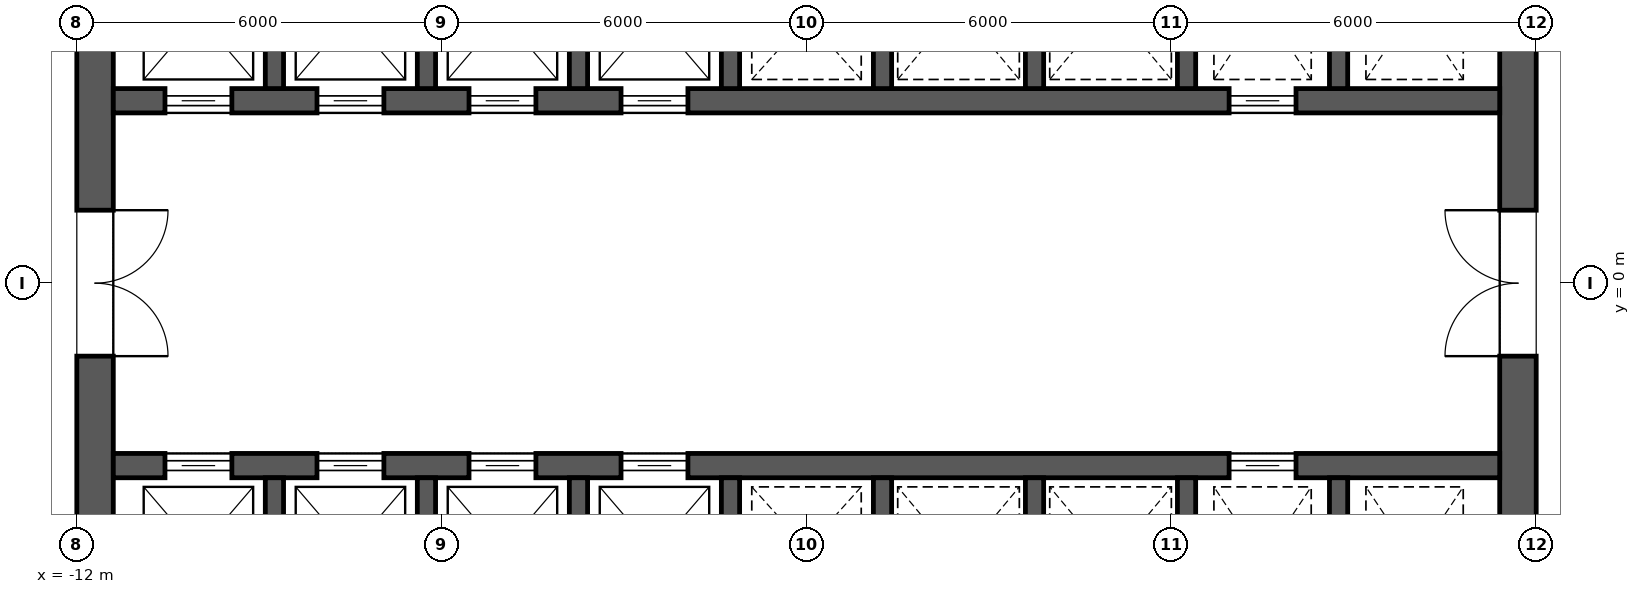
"""IFC4 building model, lengths in metres.
Left out: names, types, materials, properties, quantities, classifications, styles, units other than length and angle.
Written with IfcOpenShell. Run it as: python <this file> out.ifc"""

import sys

from ifc_helpers import new_model, si_unit, direction, frame, frame_2d, origin, place, context, subcontext, project, spatial, rectangle, extrude, element, fill, save


model = new_model("IFC4")
c1 = context("Model", 3, precision=1e-05, world=origin(), true_north=direction((0.0, 1.0)))
c2 = subcontext(c1, "Body", "Model", "MODEL_VIEW")
j1 = project(units=[si_unit("LENGTHUNIT", "METRE"), si_unit("PLANEANGLEUNIT", "RADIAN")], contexts=[c1])
p1 = place(None, origin())
s1 = spatial("IfcSite", under=j1, at=p1, CompositionType="ELEMENT")
p2 = place(p1, origin())
s2 = spatial("IfcBuilding", under=s1, at=p2, CompositionType="ELEMENT")
p3 = place(p2, frame((0.0, 0.0, 48.7)))
s3 = spatial("IfcBuildingStorey", under=s2, at=p3, CompositionType="ELEMENT", Elevation=48.7)
p4 = place(p3, frame((11.7, -11.4, 0.0), z_axis=(0.0, 0.0, 1.0), x_axis=(0.0, 1.0, 0.0)))
e1 = element("IfcWall", 1, at=p4, inside=s3, PredefinedType="SHEAR", context=c2, shape_type="SweptSolid", body=[
    extrude(rectangle(XDim=22.8, YDim=0.6, at=frame_2d((11.4, 0.0))), origin(), (0.0, 0.0, 1.0), 4.2),
])
p5 = place(p4, frame((10.2, 0.0, 0.0)))
e2 = element("IfcOpeningElement", 2, at=p5, cuts=e1, PredefinedType="OPENING", context=c2, shape_type="SweptSolid", body=[
    extrude(rectangle(XDim=2.4, YDim=2.1, at=frame_2d((1.2, 1.05))), frame((0.0, 0.312, 0.0), z_axis=(0.0, -1.0, 0.0), x_axis=(1.0, 0.0, 0.0)), (0.0, 0.0, 1.0), 0.624),
])
p6 = place(p4, frame((19.5, 0.0, 0.0)))
e3 = element("IfcOpeningElement", 3, at=p6, cuts=e1, PredefinedType="OPENING", context=c2, shape_type="SweptSolid", body=[
    extrude(rectangle(XDim=1.2, YDim=2.1, at=frame_2d((0.6, 1.05))), frame((0.0, 0.312, 0.0), z_axis=(0.0, -1.0, 0.0), x_axis=(1.0, 0.0, 0.0)), (0.0, 0.0, 1.0), 0.624),
])
p7 = place(p4, frame((2.1, 0.0, 0.0)))
e4 = element("IfcOpeningElement", 4, at=p7, cuts=e1, PredefinedType="OPENING", context=c2, shape_type="SweptSolid", body=[
    extrude(rectangle(XDim=1.2, YDim=2.1, at=frame_2d((0.6, 1.05))), frame((0.0, 0.312, 0.0), z_axis=(0.0, -1.0, 0.0), x_axis=(1.0, 0.0, 0.0)), (0.0, 0.0, 1.0), 0.624),
])
p8 = place(p3, frame((-11.7, -11.4, 0.0), z_axis=(0.0, 0.0, 1.0), x_axis=(0.0, 1.0, 0.0)))
e5 = element("IfcWall", 5, at=p8, inside=s3, PredefinedType="SHEAR", context=c2, shape_type="SweptSolid", body=[
    extrude(rectangle(XDim=22.8, YDim=0.6, at=frame_2d((11.4, 0.0))), origin(), (0.0, 0.0, 1.0), 4.2),
])
p9 = place(p8, frame((10.2, 0.0, 0.0)))
e6 = element("IfcOpeningElement", 6, at=p9, cuts=e5, PredefinedType="OPENING", context=c2, shape_type="SweptSolid", body=[
    extrude(rectangle(XDim=2.4, YDim=2.1, at=frame_2d((1.2, 1.05))), frame((0.0, 0.312, 0.0), z_axis=(0.0, -1.0, 0.0), x_axis=(1.0, 0.0, 0.0)), (0.0, 0.0, 1.0), 0.624),
])
p10 = place(p8, frame((18.925, 0.0, 0.0)))
e7 = element("IfcOpeningElement", 7, at=p10, cuts=e5, PredefinedType="OPENING", context=c2, shape_type="SweptSolid", body=[
    extrude(rectangle(XDim=1.2, YDim=2.1, at=frame_2d((0.6, 1.05))), frame((0.0, 0.312, 0.0), z_axis=(0.0, -1.0, 0.0), x_axis=(1.0, 0.0, 0.0)), (0.0, 0.0, 1.0), 0.624),
])
p11 = place(p8, frame((2.675, 0.0, 0.0)))
e8 = element("IfcOpeningElement", 8, at=p11, cuts=e5, PredefinedType="OPENING", context=c2, shape_type="SweptSolid", body=[
    extrude(rectangle(XDim=1.2, YDim=2.1, at=frame_2d((0.6, 1.05))), frame((0.0, 0.312, 0.0), z_axis=(0.0, -1.0, 0.0), x_axis=(1.0, 0.0, 0.0)), (0.0, 0.0, 1.0), 0.624),
])
p12 = place(p3, frame((-11.4, 3.0, 0.0), z_axis=(0.0, 0.0, 1.0), x_axis=(1.0, 0.0, 0.0)))
e9 = element("IfcWall", 9, at=p12, inside=s3, PredefinedType="SHEAR", context=c2, shape_type="SweptSolid", body=[
    extrude(rectangle(XDim=22.8, YDim=0.4, at=frame_2d((11.4, 0.0))), origin(), (0.0, 0.0, 1.0), 4.2),
])
p13 = place(p12, frame((0.85, 0.0, 0.0)))
e10 = element("IfcOpeningElement", 10, at=p13, cuts=e9, PredefinedType="OPENING", context=c2, shape_type="SweptSolid", body=[
    extrude(rectangle(XDim=1.1, YDim=2.1, at=frame_2d((0.55, 1.05))), frame((0.0, 0.212, 0.0), z_axis=(0.0, -1.0, 0.0), x_axis=(1.0, 0.0, 0.0)), (0.0, 0.0, 1.0), 0.424),
])
p14 = place(p12, frame((3.35, 0.0, 0.0)))
e11 = element("IfcOpeningElement", 11, at=p14, cuts=e9, PredefinedType="OPENING", context=c2, shape_type="SweptSolid", body=[
    extrude(rectangle(XDim=1.1, YDim=2.1, at=frame_2d((0.55, 1.05))), frame((0.0, 0.212, 0.0), z_axis=(0.0, -1.0, 0.0), x_axis=(1.0, 0.0, 0.0)), (0.0, 0.0, 1.0), 0.424),
])
p15 = place(p12, frame((5.85, 0.0, 0.0)))
e12 = element("IfcOpeningElement", 12, at=p15, cuts=e9, PredefinedType="OPENING", context=c2, shape_type="SweptSolid", body=[
    extrude(rectangle(XDim=1.1, YDim=2.1, at=frame_2d((0.55, 1.05))), frame((0.0, 0.212, 0.0), z_axis=(0.0, -1.0, 0.0), x_axis=(1.0, 0.0, 0.0)), (0.0, 0.0, 1.0), 0.424),
])
p16 = place(p12, frame((8.35, 0.0, 0.0)))
e13 = element("IfcOpeningElement", 13, at=p16, cuts=e9, PredefinedType="OPENING", context=c2, shape_type="SweptSolid", body=[
    extrude(rectangle(XDim=1.1, YDim=2.1, at=frame_2d((0.55, 1.05))), frame((0.0, 0.212, 0.0), z_axis=(0.0, -1.0, 0.0), x_axis=(1.0, 0.0, 0.0)), (0.0, 0.0, 1.0), 0.424),
])
p17 = place(p12, frame((18.35, 0.0, 0.0)))
e14 = element("IfcOpeningElement", 14, at=p17, cuts=e9, PredefinedType="OPENING", context=c2, shape_type="SweptSolid", body=[
    extrude(rectangle(XDim=1.1, YDim=2.1, at=frame_2d((0.55, 1.05))), frame((0.0, 0.212, 0.0), z_axis=(0.0, -1.0, 0.0), x_axis=(1.0, 0.0, 0.0)), (0.0, 0.0, 1.0), 0.424),
])
for number, where, z_axis, x_axis in (
    (15, (-8.75, 3.2, 0.0), (0.0, 0.0, 1.0), (0.0, 1.0, 0.0)),
    (16, (-6.25, 3.2, 0.0), (0.0, 0.0, 1.0), (0.0, 1.0, 0.0)),
    (17, (-3.75, 3.2, 0.0), (0.0, 0.0, 1.0), (0.0, 1.0, 0.0)),
    (18, (-1.25, 3.2, 0.0), (0.0, 0.0, 1.0), (0.0, 1.0, 0.0)),
    (19, (1.25, 3.2, 0.0), (0.0, 0.0, 1.0), (0.0, 1.0, 0.0)),
    (20, (3.75, 3.2, 0.0), (0.0, 0.0, 1.0), (0.0, 1.0, 0.0)),
    (21, (6.25, 3.2, 0.0), (0.0, 0.0, 1.0), (0.0, 1.0, 0.0)),
    (22, (8.75, 3.2, 0.0), (0.0, 0.0, 1.0), (0.0, 1.0, 0.0)),
):
    element("IfcWall", number, at=place(p3, frame(where, z_axis=z_axis, x_axis=x_axis)), inside=s3, PredefinedType="SHEAR", context=c2, shape_type="SweptSolid", body=[
        extrude(rectangle(XDim=2.9, YDim=0.3, at=frame_2d((1.45, 0.0))), origin(), (0.0, 0.0, 1.0), 4.2),
    ])
p18 = place(p3, frame((-11.4, -3.0, 0.0), z_axis=(0.0, 0.0, 1.0), x_axis=(1.0, 0.0, 0.0)))
e23 = element("IfcWall", 23, at=p18, inside=s3, PredefinedType="SHEAR", context=c2, shape_type="SweptSolid", body=[
    extrude(rectangle(XDim=22.8, YDim=0.4, at=frame_2d((11.4, 0.0))), origin(), (0.0, 0.0, 1.0), 4.2),
])
p19 = place(p18, frame((0.85, 0.0, 0.0)))
e24 = element("IfcOpeningElement", 24, at=p19, cuts=e23, PredefinedType="OPENING", context=c2, shape_type="SweptSolid", body=[
    extrude(rectangle(XDim=1.1, YDim=2.1, at=frame_2d((0.55, 1.05))), frame((0.0, 0.212, 0.0), z_axis=(0.0, -1.0, 0.0), x_axis=(1.0, 0.0, 0.0)), (0.0, 0.0, 1.0), 0.424),
])
p20 = place(p18, frame((3.35, 0.0, 0.0)))
e25 = element("IfcOpeningElement", 25, at=p20, cuts=e23, PredefinedType="OPENING", context=c2, shape_type="SweptSolid", body=[
    extrude(rectangle(XDim=1.1, YDim=2.1, at=frame_2d((0.55, 1.05))), frame((0.0, 0.212, 0.0), z_axis=(0.0, -1.0, 0.0), x_axis=(1.0, 0.0, 0.0)), (0.0, 0.0, 1.0), 0.424),
])
p21 = place(p18, frame((5.85, 0.0, 0.0)))
e26 = element("IfcOpeningElement", 26, at=p21, cuts=e23, PredefinedType="OPENING", context=c2, shape_type="SweptSolid", body=[
    extrude(rectangle(XDim=1.1, YDim=2.1, at=frame_2d((0.55, 1.05))), frame((0.0, 0.212, 0.0), z_axis=(0.0, -1.0, 0.0), x_axis=(1.0, 0.0, 0.0)), (0.0, 0.0, 1.0), 0.424),
])
p22 = place(p18, frame((8.35, 0.0, 0.0)))
e27 = element("IfcOpeningElement", 27, at=p22, cuts=e23, PredefinedType="OPENING", context=c2, shape_type="SweptSolid", body=[
    extrude(rectangle(XDim=1.1, YDim=2.1, at=frame_2d((0.55, 1.05))), frame((0.0, 0.212, 0.0), z_axis=(0.0, -1.0, 0.0), x_axis=(1.0, 0.0, 0.0)), (0.0, 0.0, 1.0), 0.424),
])
p23 = place(p18, frame((18.35, 0.0, 0.0)))
e28 = element("IfcOpeningElement", 28, at=p23, cuts=e23, PredefinedType="OPENING", context=c2, shape_type="SweptSolid", body=[
    extrude(rectangle(XDim=1.1, YDim=2.1, at=frame_2d((0.55, 1.05))), frame((0.0, 0.212, 0.0), z_axis=(0.0, -1.0, 0.0), x_axis=(1.0, 0.0, 0.0)), (0.0, 0.0, 1.0), 0.424),
])
for number, where, z_axis, x_axis in (
    (29, (-8.75, -6.1, 0.0), (0.0, 0.0, 1.0), (0.0, 1.0, 0.0)),
    (30, (-6.25, -6.1, 0.0), (0.0, 0.0, 1.0), (0.0, 1.0, 0.0)),
    (31, (-3.75, -6.1, 0.0), (0.0, 0.0, 1.0), (0.0, 1.0, 0.0)),
    (32, (-1.25, -6.1, 0.0), (0.0, 0.0, 1.0), (0.0, 1.0, 0.0)),
    (33, (1.25, -6.1, 0.0), (0.0, 0.0, 1.0), (0.0, 1.0, 0.0)),
    (34, (3.75, -6.1, 0.0), (0.0, 0.0, 1.0), (0.0, 1.0, 0.0)),
    (35, (6.25, -6.1, 0.0), (0.0, 0.0, 1.0), (0.0, 1.0, 0.0)),
    (36, (8.75, -6.1, 0.0), (0.0, 0.0, 1.0), (0.0, 1.0, 0.0)),
):
    element("IfcWall", number, at=place(p3, frame(where, z_axis=z_axis, x_axis=x_axis)), inside=s3, PredefinedType="SHEAR", context=c2, shape_type="SweptSolid", body=[
        extrude(rectangle(XDim=2.9, YDim=0.3, at=frame_2d((1.45, 0.0))), origin(), (0.0, 0.0, 1.0), 4.2),
    ])
p24 = place(p13, origin())
e37 = element("IfcDoor", 37, at=p24, inside=s3, OperationType="SLIDING_TO_LEFT", PredefinedType="DOOR", context=c2, shape_type="SweptSolid", body=[
    extrude(rectangle(XDim=1.1, YDim=2.1, at=frame_2d((0.55, 1.05))), frame((0.0, 0.025, 0.0), z_axis=(0.0, -1.0, 0.0), x_axis=(1.0, 0.0, 0.0)), (0.0, 0.0, 1.0), 0.05),
])
fill(e10, e37)
p25 = place(p14, origin())
e38 = element("IfcDoor", 38, at=p25, inside=s3, OperationType="SLIDING_TO_LEFT", PredefinedType="DOOR", context=c2, shape_type="SweptSolid", body=[
    extrude(rectangle(XDim=1.1, YDim=2.1, at=frame_2d((0.55, 1.05))), frame((0.0, 0.025, 0.0), z_axis=(0.0, -1.0, 0.0), x_axis=(1.0, 0.0, 0.0)), (0.0, 0.0, 1.0), 0.05),
])
fill(e11, e38)
p26 = place(p15, origin())
e39 = element("IfcDoor", 39, at=p26, inside=s3, OperationType="SLIDING_TO_LEFT", PredefinedType="DOOR", context=c2, shape_type="SweptSolid", body=[
    extrude(rectangle(XDim=1.1, YDim=2.1, at=frame_2d((0.55, 1.05))), frame((0.0, 0.025, 0.0), z_axis=(0.0, -1.0, 0.0), x_axis=(1.0, 0.0, 0.0)), (0.0, 0.0, 1.0), 0.05),
])
fill(e12, e39)
p27 = place(p16, origin())
e40 = element("IfcDoor", 40, at=p27, inside=s3, OperationType="SLIDING_TO_LEFT", PredefinedType="DOOR", context=c2, shape_type="SweptSolid", body=[
    extrude(rectangle(XDim=1.1, YDim=2.1, at=frame_2d((0.55, 1.05))), frame((0.0, 0.025, 0.0), z_axis=(0.0, -1.0, 0.0), x_axis=(1.0, 0.0, 0.0)), (0.0, 0.0, 1.0), 0.05),
])
fill(e13, e40)
p28 = place(p19, origin())
e41 = element("IfcDoor", 41, at=p28, inside=s3, OperationType="SLIDING_TO_LEFT", PredefinedType="DOOR", context=c2, shape_type="SweptSolid", body=[
    extrude(rectangle(XDim=1.1, YDim=2.1, at=frame_2d((0.55, 1.05))), frame((0.0, 0.025, 0.0), z_axis=(0.0, -1.0, 0.0), x_axis=(1.0, 0.0, 0.0)), (0.0, 0.0, 1.0), 0.05),
])
fill(e24, e41)
p29 = place(p20, origin())
e42 = element("IfcDoor", 42, at=p29, inside=s3, OperationType="SLIDING_TO_LEFT", PredefinedType="DOOR", context=c2, shape_type="SweptSolid", body=[
    extrude(rectangle(XDim=1.1, YDim=2.1, at=frame_2d((0.55, 1.05))), frame((0.0, 0.025, 0.0), z_axis=(0.0, -1.0, 0.0), x_axis=(1.0, 0.0, 0.0)), (0.0, 0.0, 1.0), 0.05),
])
fill(e25, e42)
p30 = place(p21, origin())
e43 = element("IfcDoor", 43, at=p30, inside=s3, OperationType="SLIDING_TO_LEFT", PredefinedType="DOOR", context=c2, shape_type="SweptSolid", body=[
    extrude(rectangle(XDim=1.1, YDim=2.1, at=frame_2d((0.55, 1.05))), frame((0.0, 0.025, 0.0), z_axis=(0.0, -1.0, 0.0), x_axis=(1.0, 0.0, 0.0)), (0.0, 0.0, 1.0), 0.05),
])
fill(e26, e43)
p31 = place(p22, origin())
e44 = element("IfcDoor", 44, at=p31, inside=s3, OperationType="SLIDING_TO_LEFT", PredefinedType="DOOR", context=c2, shape_type="SweptSolid", body=[
    extrude(rectangle(XDim=1.1, YDim=2.1, at=frame_2d((0.55, 1.05))), frame((0.0, 0.025, 0.0), z_axis=(0.0, -1.0, 0.0), x_axis=(1.0, 0.0, 0.0)), (0.0, 0.0, 1.0), 0.05),
])
fill(e27, e44)
p32 = place(p17, origin())
e45 = element("IfcDoor", 45, at=p32, inside=s3, OperationType="SLIDING_TO_LEFT", PredefinedType="DOOR", context=c2, shape_type="SweptSolid", body=[
    extrude(rectangle(XDim=1.1, YDim=2.1, at=frame_2d((0.55, 1.05))), frame((0.0, 0.025, 0.0), z_axis=(0.0, -1.0, 0.0), x_axis=(1.0, 0.0, 0.0)), (0.0, 0.0, 1.0), 0.05),
])
fill(e14, e45)
p33 = place(p23, origin())
e46 = element("IfcDoor", 46, at=p33, inside=s3, OperationType="SLIDING_TO_LEFT", PredefinedType="DOOR", context=c2, shape_type="SweptSolid", body=[
    extrude(rectangle(XDim=1.1, YDim=2.1, at=frame_2d((0.55, 1.05))), frame((0.0, 0.025, 0.0), z_axis=(0.0, -1.0, 0.0), x_axis=(1.0, 0.0, 0.0)), (0.0, 0.0, 1.0), 0.05),
])
fill(e28, e46)
p34 = place(p9, frame((2.4, 0.0, 0.0), z_axis=(0.0, 0.0, 1.0), x_axis=(-1.0, 0.0, 0.0)))
e47 = element("IfcDoor", 47, at=p34, inside=s3, OperationType="DOUBLE_DOOR_SINGLE_SWING", PredefinedType="DOOR", context=c2, shape_type="SweptSolid", body=[
    extrude(rectangle(XDim=2.4, YDim=2.1, at=frame_2d((1.2, 1.05))), frame((0.0, 0.025, 0.0), z_axis=(0.0, -1.0, 0.0), x_axis=(1.0, 0.0, 0.0)), (0.0, 0.0, 1.0), 0.05),
])
fill(e6, e47)
p35 = place(p5, origin())
e48 = element("IfcDoor", 48, at=p35, inside=s3, OperationType="DOUBLE_DOOR_SINGLE_SWING", PredefinedType="DOOR", context=c2, shape_type="SweptSolid", body=[
    extrude(rectangle(XDim=2.4, YDim=2.1, at=frame_2d((1.2, 1.05))), frame((0.0, 0.025, 0.0), z_axis=(0.0, -1.0, 0.0), x_axis=(1.0, 0.0, 0.0)), (0.0, 0.0, 1.0), 0.05),
])
fill(e2, e48)
save(model, sys.argv[1])
